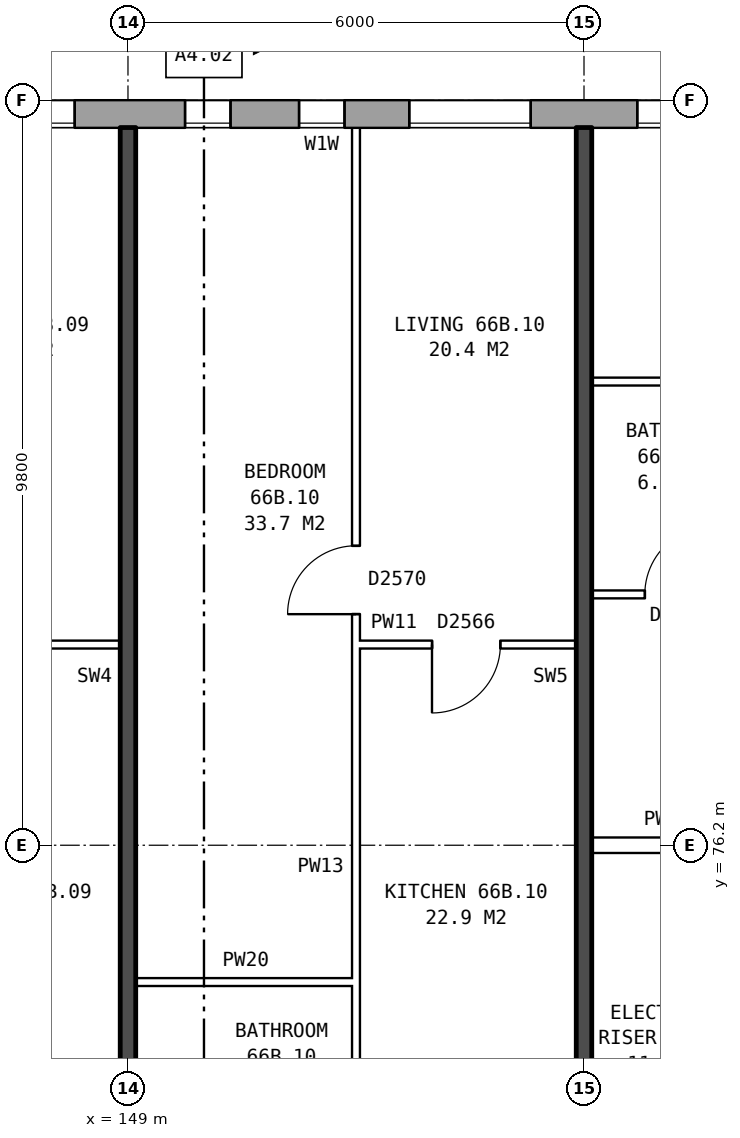
"""IFC4 building model, lengths in metres.
Left out: names, types, materials, properties, quantities, classifications, styles, units other than length and angle.
Written with IfcOpenShell. Run it as: python <this file> out.ifc"""

import sys

from ifc_helpers import new_model, si_unit, direction, frame, frame_2d, origin, place, context, subcontext, project, spatial, rectangle, extrude, element, fill, save


model = new_model("IFC4")
c1 = context("Model", 3, precision=1e-05, world=origin(), true_north=direction((0.0, 1.0)))
c2 = subcontext(c1, "Body", "Model", "MODEL_VIEW")
j1 = project(units=[si_unit("LENGTHUNIT", "METRE"), si_unit("PLANEANGLEUNIT", "RADIAN")], contexts=[c1])
p1 = place(None, origin())
s1 = spatial("IfcSite", under=j1, at=p1, CompositionType="ELEMENT")
p2 = place(p1, origin())
s2 = spatial("IfcBuilding", under=s1, at=p2, CompositionType="ELEMENT")
p3 = place(p2, frame((0.0, 0.0, 233.8)))
s3 = spatial("IfcBuildingStorey", under=s2, at=p3, CompositionType="ELEMENT", Elevation=233.8)
p4 = place(p3, frame((165.925, 85.82, 0.0), z_axis=(0.0, 0.0, 1.0), x_axis=(-1.0, 0.0, 0.0)))
e1 = element("IfcWall", 1, at=p4, inside=s3, PredefinedType="STANDARD", context=c2, shape_type="SweptSolid", body=[
    extrude(rectangle(XDim=33.875, YDim=0.36, at=frame_2d((16.938, 0.0))), origin(), (0.0, 0.0, 1.0), 2.85),
])
p5 = place(p4, frame((2.625, 0.0, 0.8)))
e2 = element("IfcOpeningElement", 2, at=p5, cuts=e1, PredefinedType="OPENING", context=c2, shape_type="SweptSolid", body=[
    extrude(rectangle(XDim=1.6, YDim=1.8, at=frame_2d((0.8, 0.9))), frame((0.0, 0.19, 0.0), z_axis=(0.0, -1.0, 0.0), x_axis=(1.0, 0.0, 0.0)), (0.0, 0.0, 1.0), 0.38),
])
p6 = place(p4, frame((5.625, 0.0, 0.8)))
e3 = element("IfcOpeningElement", 3, at=p6, cuts=e1, PredefinedType="OPENING", context=c2, shape_type="SweptSolid", body=[
    extrude(rectangle(XDim=1.6, YDim=1.8, at=frame_2d((0.8, 0.9))), frame((0.0, 0.19, 0.0), z_axis=(0.0, -1.0, 0.0), x_axis=(1.0, 0.0, 0.0)), (0.0, 0.0, 1.0), 0.38),
])
p7 = place(p4, frame((8.625, 0.0, 0.8)))
e4 = element("IfcOpeningElement", 4, at=p7, cuts=e1, PredefinedType="OPENING", context=c2, shape_type="SweptSolid", body=[
    extrude(rectangle(XDim=1.6, YDim=1.8, at=frame_2d((0.8, 0.9))), frame((0.0, 0.19, 0.0), z_axis=(0.0, -1.0, 0.0), x_axis=(1.0, 0.0, 0.0)), (0.0, 0.0, 1.0), 0.38),
])
p8 = place(p4, frame((11.625, 0.0, 0.8)))
e5 = element("IfcOpeningElement", 5, at=p8, cuts=e1, PredefinedType="OPENING", context=c2, shape_type="SweptSolid", body=[
    extrude(rectangle(XDim=1.6, YDim=1.8, at=frame_2d((0.8, 0.9))), frame((0.0, 0.19, 0.0), z_axis=(0.0, -1.0, 0.0), x_axis=(1.0, 0.0, 0.0)), (0.0, 0.0, 1.0), 0.38),
])
p9 = place(p4, frame((14.075, 0.0, 1.45)))
e6 = element("IfcOpeningElement", 6, at=p9, cuts=e1, PredefinedType="OPENING", context=c2, shape_type="SweptSolid", body=[
    extrude(rectangle(XDim=0.6, YDim=0.9, at=frame_2d((0.3, 0.45))), frame((0.0, 0.19, 0.0), z_axis=(0.0, -1.0, 0.0), x_axis=(1.0, 0.0, 0.0)), (0.0, 0.0, 1.0), 0.38),
])
p10 = place(p4, frame((17.625, 0.0, 0.8)))
e7 = element("IfcOpeningElement", 7, at=p10, cuts=e1, PredefinedType="OPENING", context=c2, shape_type="SweptSolid", body=[
    extrude(rectangle(XDim=1.6, YDim=1.8, at=frame_2d((0.8, 0.9))), frame((0.0, 0.19, 0.0), z_axis=(0.0, -1.0, 0.0), x_axis=(1.0, 0.0, 0.0)), (0.0, 0.0, 1.0), 0.38),
])
p11 = place(p4, frame((20.625, 0.0, 0.8)))
e8 = element("IfcOpeningElement", 8, at=p11, cuts=e1, PredefinedType="OPENING", context=c2, shape_type="SweptSolid", body=[
    extrude(rectangle(XDim=1.6, YDim=1.8, at=frame_2d((0.8, 0.9))), frame((0.0, 0.19, 0.0), z_axis=(0.0, -1.0, 0.0), x_axis=(1.0, 0.0, 0.0)), (0.0, 0.0, 1.0), 0.38),
])
p12 = place(p4, frame((23.625, 0.0, 0.8)))
e9 = element("IfcOpeningElement", 9, at=p12, cuts=e1, PredefinedType="OPENING", context=c2, shape_type="SweptSolid", body=[
    extrude(rectangle(XDim=1.6, YDim=1.8, at=frame_2d((0.8, 0.9))), frame((0.0, 0.19, 0.0), z_axis=(0.0, -1.0, 0.0), x_axis=(1.0, 0.0, 0.0)), (0.0, 0.0, 1.0), 0.38),
])
p13 = place(p4, frame((26.625, 0.0, 0.8)))
e10 = element("IfcOpeningElement", 10, at=p13, cuts=e1, PredefinedType="OPENING", context=c2, shape_type="SweptSolid", body=[
    extrude(rectangle(XDim=1.6, YDim=1.8, at=frame_2d((0.8, 0.9))), frame((0.0, 0.19, 0.0), z_axis=(0.0, -1.0, 0.0), x_axis=(1.0, 0.0, 0.0)), (0.0, 0.0, 1.0), 0.38),
])
p14 = place(p4, frame((29.625, 0.0, 0.8)))
e11 = element("IfcOpeningElement", 11, at=p14, cuts=e1, PredefinedType="OPENING", context=c2, shape_type="SweptSolid", body=[
    extrude(rectangle(XDim=1.6, YDim=1.8, at=frame_2d((0.8, 0.9))), frame((0.0, 0.19, 0.0), z_axis=(0.0, -1.0, 0.0), x_axis=(1.0, 0.0, 0.0)), (0.0, 0.0, 1.0), 0.38),
])
p15 = place(p4, frame((15.575, 0.0, 0.15)))
e12 = element("IfcOpeningElement", 12, at=p15, cuts=e1, PredefinedType="OPENING", context=c2, shape_type="SweptSolid", body=[
    extrude(rectangle(XDim=0.6, YDim=0.9, at=frame_2d((0.3, 0.45))), frame((0.0, 0.19, 0.0), z_axis=(0.0, -1.0, 0.0), x_axis=(1.0, 0.0, 0.0)), (0.0, 0.0, 1.0), 0.38),
])
p16 = place(p3, frame((149.1, 74.4, 0.0), z_axis=(0.0, 0.0, 1.0), x_axis=(1.0, 0.0, 0.0)))
e13 = element("IfcWall", 13, at=p16, inside=s3, PredefinedType="PARTITIONING", context=c2, shape_type="SweptSolid", body=[
    extrude(rectangle(XDim=2.9, YDim=0.1, at=frame_2d((1.45, 0.0))), origin(), (0.0, 0.0, 1.0), 2.85),
])
p17 = place(p3, frame((155.1, 76.2, 0.0), z_axis=(0.0, 0.0, 1.0), x_axis=(1.0, 0.0, 0.0)))
e14 = element("IfcWall", 14, at=p17, inside=s3, PredefinedType="PARTITIONING", context=c2, shape_type="SweptSolid", body=[
    extrude(rectangle(XDim=2.14, YDim=0.2, at=frame_2d((1.07, 0.0))), origin(), (0.0, 0.0, 1.0), 2.85),
])
p18 = place(p3, frame((146.0, 78.84, 0.0), z_axis=(0.0, 0.0, 1.0), x_axis=(1.0, 0.0, 0.0)))
e15 = element("IfcWall", 15, at=p18, inside=s3, PredefinedType="PARTITIONING", context=c2, shape_type="SweptSolid", body=[
    extrude(rectangle(XDim=2.9, YDim=0.1, at=frame_2d((1.45, 0.0))), origin(), (0.0, 0.0, 1.0), 2.85),
])
p19 = place(p18, frame((1.0, 0.0, 0.0)))
e16 = element("IfcOpeningElement", 16, at=p19, cuts=e15, PredefinedType="OPENING", context=c2, shape_type="SweptSolid", body=[
    extrude(rectangle(XDim=0.9, YDim=2.1, at=frame_2d((0.45, 1.05))), frame((0.0, 0.06, 0.0), z_axis=(0.0, -1.0, 0.0), x_axis=(1.0, 0.0, 0.0)), (0.0, 0.0, 1.0), 0.12),
])
p20 = place(p3, frame((152.0, 78.84, 0.0), z_axis=(0.0, 0.0, 1.0), x_axis=(1.0, 0.0, 0.0)))
e17 = element("IfcWall", 17, at=p20, inside=s3, PredefinedType="PARTITIONING", context=c2, shape_type="SweptSolid", body=[
    extrude(rectangle(XDim=2.9, YDim=0.1, at=frame_2d((1.45, 0.0))), origin(), (0.0, 0.0, 1.0), 2.85),
])
p21 = place(p20, frame((1.0, 0.0, 0.0)))
e18 = element("IfcOpeningElement", 18, at=p21, cuts=e17, PredefinedType="OPENING", context=c2, shape_type="SweptSolid", body=[
    extrude(rectangle(XDim=0.9, YDim=2.1, at=frame_2d((0.45, 1.05))), frame((0.0, 0.06, 0.0), z_axis=(0.0, -1.0, 0.0), x_axis=(1.0, 0.0, 0.0)), (0.0, 0.0, 1.0), 0.12),
])
p22 = place(p3, frame((155.1, 79.5, 0.0), z_axis=(0.0, 0.0, 1.0), x_axis=(1.0, 0.0, 0.0)))
e19 = element("IfcWall", 19, at=p22, inside=s3, PredefinedType="PARTITIONING", context=c2, shape_type="SweptSolid", body=[
    extrude(rectangle(XDim=5.8, YDim=0.1, at=frame_2d((2.9, 0.0))), origin(), (0.0, 0.0, 1.0), 2.85),
])
p23 = place(p22, frame((3.6, 0.0, 0.0)))
e20 = element("IfcOpeningElement", 20, at=p23, cuts=e19, PredefinedType="OPENING", context=c2, shape_type="SweptSolid", body=[
    extrude(rectangle(XDim=0.9, YDim=2.1, at=frame_2d((0.45, 1.05))), frame((0.0, 0.06, 0.0), z_axis=(0.0, -1.0, 0.0), x_axis=(1.0, 0.0, 0.0)), (0.0, 0.0, 1.0), 0.12),
])
p24 = place(p22, frame((0.7, 0.0, 0.0)))
e21 = element("IfcOpeningElement", 21, at=p24, cuts=e19, PredefinedType="OPENING", context=c2, shape_type="SweptSolid", body=[
    extrude(rectangle(XDim=0.9, YDim=2.1, at=frame_2d((0.45, 1.05))), frame((0.0, 0.06, 0.0), z_axis=(0.0, -1.0, 0.0), x_axis=(1.0, 0.0, 0.0)), (0.0, 0.0, 1.0), 0.12),
])
p25 = place(p3, frame((155.1, 82.3, 0.0), z_axis=(0.0, 0.0, 1.0), x_axis=(1.0, 0.0, 0.0)))
e22 = element("IfcWall", 22, at=p25, inside=s3, PredefinedType="PARTITIONING", context=c2, shape_type="SweptSolid", body=[
    extrude(rectangle(XDim=2.3, YDim=0.1, at=frame_2d((1.15, 0.0))), origin(), (0.0, 0.0, 1.0), 2.85),
])
p26 = place(p3, frame((149.0, 71.2, 0.0), z_axis=(0.0, 0.0, 1.0), x_axis=(0.0, 1.0, 0.0)))
e23 = element("IfcWall", 23, at=p26, inside=s3, PredefinedType="SOLIDWALL", context=c2, shape_type="SweptSolid", body=[
    extrude(rectangle(XDim=14.44, YDim=0.2, at=frame_2d((7.22, 0.0))), origin(), (0.0, 0.0, 1.0), 2.85),
])
p27 = place(p3, frame((152.0, 71.3, 0.0), z_axis=(0.0, 0.0, 1.0), x_axis=(0.0, 1.0, 0.0)))
e24 = element("IfcWall", 24, at=p27, inside=s3, PredefinedType="PARTITIONING", context=c2, shape_type="SweptSolid", body=[
    extrude(rectangle(XDim=14.34, YDim=0.1, at=frame_2d((7.17, 0.0))), origin(), (0.0, 0.0, 1.0), 2.85),
])
p28 = place(p27, frame((7.94, 0.0, 0.0)))
e25 = element("IfcOpeningElement", 25, at=p28, cuts=e24, PredefinedType="OPENING", context=c2, shape_type="SweptSolid", body=[
    extrude(rectangle(XDim=0.9, YDim=2.1, at=frame_2d((0.45, 1.05))), frame((0.0, 0.06, 0.0), z_axis=(0.0, -1.0, 0.0), x_axis=(1.0, 0.0, 0.0)), (0.0, 0.0, 1.0), 0.12),
])
p29 = place(p27, frame((0.4, 0.0, 0.0)))
e26 = element("IfcOpeningElement", 26, at=p29, cuts=e24, PredefinedType="OPENING", context=c2, shape_type="SweptSolid", body=[
    extrude(rectangle(XDim=0.9, YDim=2.1, at=frame_2d((0.45, 1.05))), frame((0.0, 0.06, 0.0), z_axis=(0.0, -1.0, 0.0), x_axis=(1.0, 0.0, 0.0)), (0.0, 0.0, 1.0), 0.12),
])
p30 = place(p3, frame((155.0, 71.2, 0.0), z_axis=(0.0, 0.0, 1.0), x_axis=(0.0, 1.0, 0.0)))
e27 = element("IfcWall", 27, at=p30, inside=s3, PredefinedType="SOLIDWALL", context=c2, shape_type="SweptSolid", body=[
    extrude(rectangle(XDim=14.44, YDim=0.2, at=frame_2d((7.22, 0.0))), origin(), (0.0, 0.0, 1.0), 2.85),
])
p31 = place(p7, origin())
e28 = element("IfcWindow", 28, at=p31, inside=s3, PartitioningType="SINGLE_PANEL", PredefinedType="WINDOW", context=c2, shape_type="SweptSolid", body=[
    extrude(rectangle(XDim=1.6, YDim=1.8, at=frame_2d((0.8, 0.9))), frame((0.0, 0.15, 0.0), z_axis=(0.0, -1.0, 0.0), x_axis=(1.0, 0.0, 0.0)), (0.0, 0.0, 1.0), 0.06),
])
fill(e4, e28)
p32 = place(p8, origin())
e29 = element("IfcWindow", 29, at=p32, inside=s3, PartitioningType="SINGLE_PANEL", PredefinedType="WINDOW", context=c2, shape_type="SweptSolid", body=[
    extrude(rectangle(XDim=1.6, YDim=1.8, at=frame_2d((0.8, 0.9))), frame((0.0, 0.15, 0.0), z_axis=(0.0, -1.0, 0.0), x_axis=(1.0, 0.0, 0.0)), (0.0, 0.0, 1.0), 0.06),
])
fill(e5, e29)
p33 = place(p9, origin())
e30 = element("IfcWindow", 30, at=p33, inside=s3, PartitioningType="SINGLE_PANEL", PredefinedType="WINDOW", context=c2, shape_type="SweptSolid", body=[
    extrude(rectangle(XDim=0.6, YDim=0.9, at=frame_2d((0.3, 0.45))), frame((0.0, 0.15, 0.0), z_axis=(0.0, -1.0, 0.0), x_axis=(1.0, 0.0, 0.0)), (0.0, 0.0, 1.0), 0.06),
])
fill(e6, e30)
p34 = place(p10, origin())
e31 = element("IfcWindow", 31, at=p34, inside=s3, PartitioningType="SINGLE_PANEL", PredefinedType="WINDOW", context=c2, shape_type="SweptSolid", body=[
    extrude(rectangle(XDim=1.6, YDim=1.8, at=frame_2d((0.8, 0.9))), frame((0.0, 0.15, 0.0), z_axis=(0.0, -1.0, 0.0), x_axis=(1.0, 0.0, 0.0)), (0.0, 0.0, 1.0), 0.06),
])
fill(e7, e31)
p35 = place(p24, origin())
e32 = element("IfcDoor", 32, at=p35, inside=s3, OperationType="SINGLE_SWING_RIGHT", PredefinedType="DOOR", context=c2, shape_type="SweptSolid", body=[
    extrude(rectangle(XDim=0.9, YDim=2.1, at=frame_2d((0.45, 1.05))), frame((0.0, 0.025, 0.0), z_axis=(0.0, -1.0, 0.0), x_axis=(1.0, 0.0, 0.0)), (0.0, 0.0, 1.0), 0.05),
])
fill(e21, e32)
p36 = place(p28, origin())
e33 = element("IfcDoor", 33, at=p36, inside=s3, OperationType="SINGLE_SWING_LEFT", PredefinedType="DOOR", context=c2, shape_type="SweptSolid", body=[
    extrude(rectangle(XDim=0.9, YDim=2.1, at=frame_2d((0.45, 1.05))), frame((0.0, 0.025, 0.0), z_axis=(0.0, -1.0, 0.0), x_axis=(1.0, 0.0, 0.0)), (0.0, 0.0, 1.0), 0.05),
])
fill(e25, e33)
p37 = place(p21, frame((0.9, 0.0, 0.0), z_axis=(0.0, 0.0, 1.0), x_axis=(-1.0, 0.0, 0.0)))
e34 = element("IfcDoor", 34, at=p37, inside=s3, OperationType="SINGLE_SWING_RIGHT", PredefinedType="DOOR", context=c2, shape_type="SweptSolid", body=[
    extrude(rectangle(XDim=0.9, YDim=2.1, at=frame_2d((0.45, 1.05))), frame((0.0, 0.025, 0.0), z_axis=(0.0, -1.0, 0.0), x_axis=(1.0, 0.0, 0.0)), (0.0, 0.0, 1.0), 0.05),
])
fill(e18, e34)
p38 = place(p15, origin())
e35 = element("IfcWindow", 35, at=p38, inside=s3, PartitioningType="SINGLE_PANEL", PredefinedType="WINDOW", context=c2, shape_type="SweptSolid", body=[
    extrude(rectangle(XDim=0.6, YDim=0.9, at=frame_2d((0.3, 0.45))), frame((0.0, 0.15, 0.0), z_axis=(0.0, -1.0, 0.0), x_axis=(1.0, 0.0, 0.0)), (0.0, 0.0, 1.0), 0.06),
])
fill(e12, e35)
save(model, sys.argv[1])
